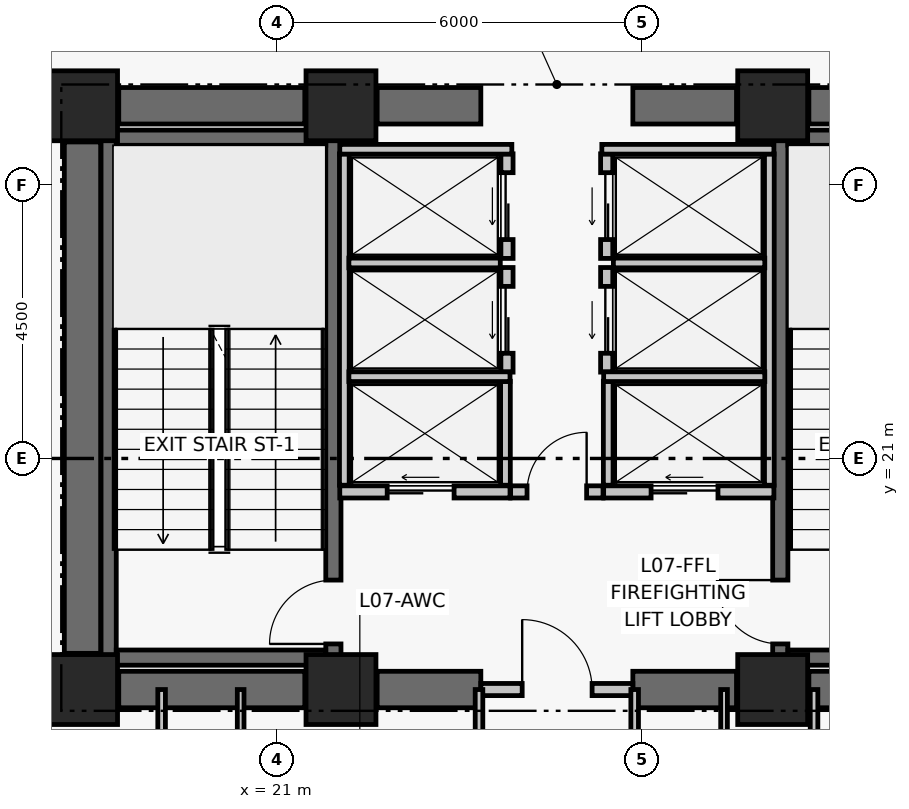
"""IFC4 building model, lengths in metres.
Left out: names, types, materials, properties, quantities, classifications, styles, units other than length and angle.
Written with IfcOpenShell. Run it as: python <this file> out.ifc"""

import sys

from ifc_helpers import new_model, si_unit, direction, frame, frame_2d, origin, origin_2d, place, context, subcontext, project, spatial, rectangle, extrude, element, fill, save


model = new_model("IFC4")
c1 = context("Model", 3, precision=1e-05, world=origin(), true_north=direction((0.0, 1.0)))
c2 = subcontext(c1, "Body", "Model", "MODEL_VIEW")
j1 = project(units=[si_unit("LENGTHUNIT", "METRE"), si_unit("PLANEANGLEUNIT", "RADIAN")], contexts=[c1])
p1 = place(None, origin())
s1 = spatial("IfcSite", under=j1, at=p1, CompositionType="ELEMENT")
p2 = place(p1, origin())
s2 = spatial("IfcBuilding", under=s1, at=p2, CompositionType="ELEMENT")
p3 = place(p2, frame((0.0, 0.0, 35.04)))
s3 = spatial("IfcBuildingStorey", under=s2, at=p3, CompositionType="ELEMENT", Elevation=35.04)
for number, where, z_axis, x_axis in (
    (1, (17.8, 17.2, 0.0), (0.0, 0.0, 1.0), (1.0, 0.0, 0.0)),
    (2, (22.05, 17.2, 0.0), (0.0, 0.0, 1.0), (1.0, 0.0, 0.0)),
    (3, (29.15, 17.2, 0.0), (0.0, 0.0, 1.0), (1.0, 0.0, 0.0)),
    (4, (17.8, 26.8, 0.0), (0.0, 0.0, 1.0), (1.0, 0.0, 0.0)),
    (5, (22.05, 26.8, 0.0), (0.0, 0.0, 1.0), (1.0, 0.0, 0.0)),
    (6, (29.15, 26.8, 0.0), (0.0, 0.0, 1.0), (1.0, 0.0, 0.0)),
):
    element("IfcColumn", number, at=place(p3, frame(where, z_axis=z_axis, x_axis=x_axis)), inside=s3, PredefinedType="COLUMN", context=c2, shape_type="SweptSolid", body=[
        extrude(rectangle(XDim=1.15, YDim=1.15, at=origin_2d()), origin(), (0.0, 0.0, 1.0), 3.72),
    ])
p4 = place(p3, frame((18.395, 17.2, 0.0), z_axis=(0.0, 0.0, 1.0), x_axis=(1.0, 0.0, 0.0)))
e7 = element("IfcWall", 7, at=p4, inside=s3, PredefinedType="SHEAR", context=c2, shape_type="SweptSolid", body=[
    extrude(rectangle(XDim=3.06, YDim=0.6, at=frame_2d((1.53, 0.0))), origin(), (0.0, 0.0, 1.0), 3.47),
])
p5 = place(p3, frame((22.645, 17.2, 0.0), z_axis=(0.0, 0.0, 1.0), x_axis=(1.0, 0.0, 0.0)))
e8 = element("IfcWall", 8, at=p5, inside=s3, PredefinedType="SHEAR", context=c2, shape_type="SweptSolid", body=[
    extrude(rectangle(XDim=1.705, YDim=0.6, at=frame_2d((0.853, 0.0))), origin(), (0.0, 0.0, 1.0), 3.47),
])
p6 = place(p3, frame((26.85, 17.2, 0.0), z_axis=(0.0, 0.0, 1.0), x_axis=(1.0, 0.0, 0.0)))
e9 = element("IfcWall", 9, at=p6, inside=s3, PredefinedType="SHEAR", context=c2, shape_type="SweptSolid", body=[
    extrude(rectangle(XDim=1.705, YDim=0.6, at=frame_2d((0.853, 0.0))), origin(), (0.0, 0.0, 1.0), 3.47),
])
p7 = place(p3, frame((29.745, 17.2, 0.0), z_axis=(0.0, 0.0, 1.0), x_axis=(1.0, 0.0, 0.0)))
e10 = element("IfcWall", 10, at=p7, inside=s3, PredefinedType="SHEAR", context=c2, shape_type="SweptSolid", body=[
    extrude(rectangle(XDim=3.06, YDim=0.6, at=frame_2d((1.53, 0.0))), origin(), (0.0, 0.0, 1.0), 3.47),
])
p8 = place(p3, frame((18.395, 26.8, 0.0), z_axis=(0.0, 0.0, 1.0), x_axis=(1.0, 0.0, 0.0)))
e11 = element("IfcWall", 11, at=p8, inside=s3, PredefinedType="SHEAR", context=c2, shape_type="SweptSolid", body=[
    extrude(rectangle(XDim=3.06, YDim=0.6, at=frame_2d((1.53, 0.0))), origin(), (0.0, 0.0, 1.0), 3.47),
])
p9 = place(p3, frame((22.645, 26.8, 0.0), z_axis=(0.0, 0.0, 1.0), x_axis=(1.0, 0.0, 0.0)))
e12 = element("IfcWall", 12, at=p9, inside=s3, PredefinedType="SHEAR", context=c2, shape_type="SweptSolid", body=[
    extrude(rectangle(XDim=1.705, YDim=0.6, at=frame_2d((0.853, 0.0))), origin(), (0.0, 0.0, 1.0), 3.47),
])
p10 = place(p3, frame((26.85, 26.8, 0.0), z_axis=(0.0, 0.0, 1.0), x_axis=(1.0, 0.0, 0.0)))
e13 = element("IfcWall", 13, at=p10, inside=s3, PredefinedType="SHEAR", context=c2, shape_type="SweptSolid", body=[
    extrude(rectangle(XDim=1.705, YDim=0.6, at=frame_2d((0.853, 0.0))), origin(), (0.0, 0.0, 1.0), 3.47),
])
p11 = place(p3, frame((29.745, 26.8, 0.0), z_axis=(0.0, 0.0, 1.0), x_axis=(1.0, 0.0, 0.0)))
e14 = element("IfcWall", 14, at=p11, inside=s3, PredefinedType="SHEAR", context=c2, shape_type="SweptSolid", body=[
    extrude(rectangle(XDim=3.06, YDim=0.6, at=frame_2d((1.53, 0.0))), origin(), (0.0, 0.0, 1.0), 3.47),
])
p12 = place(p3, frame((17.8, 17.795, 0.0), z_axis=(0.0, 0.0, 1.0), x_axis=(0.0, 1.0, 0.0)))
e15 = element("IfcWall", 15, at=p12, inside=s3, PredefinedType="SHEAR", context=c2, shape_type="SweptSolid", body=[
    extrude(rectangle(XDim=8.41, YDim=0.6, at=frame_2d((4.205, 0.0))), origin(), (0.0, 0.0, 1.0), 3.47),
])
p13 = place(p3, frame((18.229, 17.6, 0.0), z_axis=(0.0, 0.0, 1.0), x_axis=(0.0, 1.0, 0.0)))
e16 = element("IfcWall", 16, at=p13, inside=s3, PredefinedType="SHEAR", context=c2, shape_type="SweptSolid", body=[
    extrude(rectangle(XDim=8.8, YDim=0.25, at=frame_2d((4.4, 0.0))), origin(), (0.0, 0.0, 1.0), 3.47),
])
p14 = place(p3, frame((21.925, 17.6, 0.0), z_axis=(0.0, 0.0, 1.0), x_axis=(0.0, 1.0, 0.0)))
e17 = element("IfcWall", 17, at=p14, inside=s3, PredefinedType="SHEAR", context=c2, shape_type="SweptSolid", body=[
    extrude(rectangle(XDim=8.8, YDim=0.25, at=frame_2d((4.4, 0.0))), origin(), (0.0, 0.0, 1.0), 3.47),
])
p15 = place(p14, frame((0.35, 0.0, 0.0)))
e18 = element("IfcOpeningElement", 18, at=p15, cuts=e17, PredefinedType="OPENING", context=c2, shape_type="SweptSolid", body=[
    extrude(rectangle(XDim=1.05, YDim=2.08, at=frame_2d((0.525, 1.04))), frame((0.0, 0.135, 0.0), z_axis=(0.0, -1.0, 0.0), x_axis=(1.0, 0.0, 0.0)), (0.0, 0.0, 1.0), 0.27),
])
for number, where, z_axis, x_axis in (
    (19, (18.354, 17.725, 0.0), (0.0, 0.0, 1.0), (1.0, 0.0, 0.0)),
    (20, (18.354, 26.275, 0.0), (0.0, 0.0, 1.0), (1.0, 0.0, 0.0)),
):
    element("IfcWall", number, at=place(p3, frame(where, z_axis=z_axis, x_axis=x_axis)), inside=s3, PredefinedType="SHEAR", context=c2, shape_type="SweptSolid", body=[
        extrude(rectangle(XDim=3.446, YDim=0.25, at=frame_2d((1.723, 0.0))), origin(), (0.0, 0.0, 1.0), 3.47),
    ])
p16 = place(p3, frame((29.275, 17.6, 0.0), z_axis=(0.0, 0.0, 1.0), x_axis=(0.0, 1.0, 0.0)))
e21 = element("IfcWall", 21, at=p16, inside=s3, PredefinedType="SHEAR", context=c2, shape_type="SweptSolid", body=[
    extrude(rectangle(XDim=8.8, YDim=0.25, at=frame_2d((4.4, 0.0))), origin(), (0.0, 0.0, 1.0), 3.47),
])
p17 = place(p16, frame((0.35, 0.0, 0.0)))
e22 = element("IfcOpeningElement", 22, at=p17, cuts=e21, PredefinedType="OPENING", context=c2, shape_type="SweptSolid", body=[
    extrude(rectangle(XDim=1.05, YDim=2.08, at=frame_2d((0.525, 1.04))), frame((0.0, 0.135, 0.0), z_axis=(0.0, -1.0, 0.0), x_axis=(1.0, 0.0, 0.0)), (0.0, 0.0, 1.0), 0.27),
])
for number, where, z_axis, x_axis in (
    (23, (29.4, 17.725, 0.0), (0.0, 0.0, 1.0), (1.0, 0.0, 0.0)),
    (24, (29.4, 26.275, 0.0), (0.0, 0.0, 1.0), (1.0, 0.0, 0.0)),
):
    element("IfcWall", number, at=place(p3, frame(where, z_axis=z_axis, x_axis=x_axis)), inside=s3, PredefinedType="SHEAR", context=c2, shape_type="SweptSolid", body=[
        extrude(rectangle(XDim=3.446, YDim=0.25, at=frame_2d((1.723, 0.0))), origin(), (0.0, 0.0, 1.0), 3.47),
    ])
p18 = place(p3, frame((24.35, 17.2, 0.0), z_axis=(0.0, 0.0, 1.0), x_axis=(1.0, 0.0, 0.0)))
e25 = element("IfcWall", 25, at=p18, inside=s3, PredefinedType="PARTITIONING", context=c2, shape_type="SweptSolid", body=[
    extrude(rectangle(XDim=2.5, YDim=0.2, at=frame_2d((1.25, 0.0))), origin(), (0.0, 0.0, 1.0), 2.6),
])
p19 = place(p18, frame((0.68, 0.0, 0.0)))
e26 = element("IfcOpeningElement", 26, at=p19, cuts=e25, PredefinedType="OPENING", context=c2, shape_type="SweptSolid", body=[
    extrude(rectangle(XDim=1.15, YDim=2.08, at=frame_2d((0.575, 1.04))), frame((0.0, 0.11, 0.0), z_axis=(0.0, -1.0, 0.0), x_axis=(1.0, 0.0, 0.0)), (0.0, 0.0, 1.0), 0.22),
])
p20 = place(p3, frame((24.84, 20.45, 0.0), z_axis=(0.0, 0.0, 1.0), x_axis=(1.0, 0.0, 0.0)))
e27 = element("IfcWall", 27, at=p20, inside=s3, PredefinedType="PARTITIONING", context=c2, shape_type="SweptSolid", body=[
    extrude(rectangle(XDim=1.52, YDim=0.2, at=frame_2d((0.76, 0.0))), origin(), (0.0, 0.0, 1.0), 3.47),
])
p21 = place(p20, frame((0.27, 0.0, 0.0)))
e28 = element("IfcOpeningElement", 28, at=p21, cuts=e27, PredefinedType="OPENING", context=c2, shape_type="SweptSolid", body=[
    extrude(rectangle(XDim=0.98, YDim=2.06, at=frame_2d((0.49, 1.03))), frame((0.0, 0.11, 0.0), z_axis=(0.0, -1.0, 0.0), x_axis=(1.0, 0.0, 0.0)), (0.0, 0.0, 1.0), 0.22),
])
p22 = place(p3, frame((22.03, 20.45, 0.0), z_axis=(0.0, 0.0, 1.0), x_axis=(1.0, 0.0, 0.0)))
e29 = element("IfcWall", 29, at=p22, inside=s3, PredefinedType="PARTITIONING", context=c2, shape_type="SweptSolid", body=[
    extrude(rectangle(XDim=2.8, YDim=0.2, at=frame_2d((1.4, 0.0))), origin(), (0.0, 0.0, 1.0), 3.47),
])
p23 = place(p22, frame((0.78, 0.0, 0.0)))
e30 = element("IfcOpeningElement", 30, at=p23, cuts=e29, PredefinedType="OPENING", context=c2, shape_type="SweptSolid", body=[
    extrude(rectangle(XDim=1.1, YDim=2.08, at=frame_2d((0.55, 1.04))), frame((0.0, 0.11, 0.0), z_axis=(0.0, -1.0, 0.0), x_axis=(1.0, 0.0, 0.0)), (0.0, 0.0, 1.0), 0.22),
])
p24 = place(p3, frame((26.37, 20.45, 0.0), z_axis=(0.0, 0.0, 1.0), x_axis=(1.0, 0.0, 0.0)))
e31 = element("IfcWall", 31, at=p24, inside=s3, PredefinedType="PARTITIONING", context=c2, shape_type="SweptSolid", body=[
    extrude(rectangle(XDim=2.8, YDim=0.2, at=frame_2d((1.4, 0.0))), origin(), (0.0, 0.0, 1.0), 3.47),
])
p25 = place(p24, frame((0.78, 0.0, 0.0)))
e32 = element("IfcOpeningElement", 32, at=p25, cuts=e31, PredefinedType="OPENING", context=c2, shape_type="SweptSolid", body=[
    extrude(rectangle(XDim=1.1, YDim=2.08, at=frame_2d((0.55, 1.04))), frame((0.0, 0.11, 0.0), z_axis=(0.0, -1.0, 0.0), x_axis=(1.0, 0.0, 0.0)), (0.0, 0.0, 1.0), 0.22),
])
p26 = place(p3, frame((24.78, 22.42, 0.0), z_axis=(0.0, 0.0, 1.0), x_axis=(0.0, 1.0, 0.0)))
e33 = element("IfcWall", 33, at=p26, inside=s3, PredefinedType="PARTITIONING", context=c2, shape_type="SweptSolid", body=[
    extrude(rectangle(XDim=1.72, YDim=0.2, at=frame_2d((0.86, 0.0))), origin(), (0.0, 0.0, 1.0), 3.47),
])
p27 = place(p26, frame((0.31, 0.0, 0.0)))
e34 = element("IfcOpeningElement", 34, at=p27, cuts=e33, PredefinedType="OPENING", context=c2, shape_type="SweptSolid", body=[
    extrude(rectangle(XDim=1.1, YDim=2.08, at=frame_2d((0.55, 1.04))), frame((0.0, 0.11, 0.0), z_axis=(0.0, -1.0, 0.0), x_axis=(1.0, 0.0, 0.0)), (0.0, 0.0, 1.0), 0.22),
])
p28 = place(p3, frame((24.78, 24.29, 0.0), z_axis=(0.0, 0.0, 1.0), x_axis=(0.0, 1.0, 0.0)))
e35 = element("IfcWall", 35, at=p28, inside=s3, PredefinedType="PARTITIONING", context=c2, shape_type="SweptSolid", body=[
    extrude(rectangle(XDim=1.72, YDim=0.2, at=frame_2d((0.86, 0.0))), origin(), (0.0, 0.0, 1.0), 3.47),
])
p29 = place(p28, frame((0.31, 0.0, 0.0)))
e36 = element("IfcOpeningElement", 36, at=p29, cuts=e35, PredefinedType="OPENING", context=c2, shape_type="SweptSolid", body=[
    extrude(rectangle(XDim=1.1, YDim=2.08, at=frame_2d((0.55, 1.04))), frame((0.0, 0.11, 0.0), z_axis=(0.0, -1.0, 0.0), x_axis=(1.0, 0.0, 0.0)), (0.0, 0.0, 1.0), 0.22),
])
p30 = place(p3, frame((26.42, 22.42, 0.0), z_axis=(0.0, 0.0, 1.0), x_axis=(0.0, 1.0, 0.0)))
e37 = element("IfcWall", 37, at=p30, inside=s3, PredefinedType="PARTITIONING", context=c2, shape_type="SweptSolid", body=[
    extrude(rectangle(XDim=1.72, YDim=0.2, at=frame_2d((0.86, 0.0))), origin(), (0.0, 0.0, 1.0), 3.47),
])
p31 = place(p30, frame((0.31, 0.0, 0.0)))
e38 = element("IfcOpeningElement", 38, at=p31, cuts=e37, PredefinedType="OPENING", context=c2, shape_type="SweptSolid", body=[
    extrude(rectangle(XDim=1.1, YDim=2.08, at=frame_2d((0.55, 1.04))), frame((0.0, 0.11, 0.0), z_axis=(0.0, -1.0, 0.0), x_axis=(1.0, 0.0, 0.0)), (0.0, 0.0, 1.0), 0.22),
])
p32 = place(p3, frame((26.42, 24.29, 0.0), z_axis=(0.0, 0.0, 1.0), x_axis=(0.0, 1.0, 0.0)))
e39 = element("IfcWall", 39, at=p32, inside=s3, PredefinedType="PARTITIONING", context=c2, shape_type="SweptSolid", body=[
    extrude(rectangle(XDim=1.72, YDim=0.2, at=frame_2d((0.86, 0.0))), origin(), (0.0, 0.0, 1.0), 3.47),
])
p33 = place(p32, frame((0.31, 0.0, 0.0)))
e40 = element("IfcOpeningElement", 40, at=p33, cuts=e39, PredefinedType="OPENING", context=c2, shape_type="SweptSolid", body=[
    extrude(rectangle(XDim=1.1, YDim=2.08, at=frame_2d((0.55, 1.04))), frame((0.0, 0.11, 0.0), z_axis=(0.0, -1.0, 0.0), x_axis=(1.0, 0.0, 0.0)), (0.0, 0.0, 1.0), 0.22),
])
p34 = place(p3, frame((22.105, 20.56, 0.0), z_axis=(0.0, 0.0, 1.0), x_axis=(0.0, 1.0, 0.0)))
e41 = element("IfcWall", 41, at=p34, inside=s3, PredefinedType="PARTITIONING", context=c2, shape_type="SweptSolid", body=[
    extrude(rectangle(XDim=5.45, YDim=0.16, at=frame_2d((2.725, 0.0))), origin(), (0.0, 0.0, 1.0), 3.47),
])
p35 = place(p3, frame((24.755, 20.56, 0.0), z_axis=(0.0, 0.0, 1.0), x_axis=(0.0, 1.0, 0.0)))
e42 = element("IfcWall", 42, at=p35, inside=s3, PredefinedType="PARTITIONING", context=c2, shape_type="SweptSolid", body=[
    extrude(rectangle(XDim=1.71, YDim=0.16, at=frame_2d((0.855, 0.0))), origin(), (0.0, 0.0, 1.0), 3.47),
])
p36 = place(p3, frame((22.18, 22.345, 0.0), z_axis=(0.0, 0.0, 1.0), x_axis=(1.0, 0.0, 0.0)))
e43 = element("IfcWall", 43, at=p36, inside=s3, PredefinedType="PARTITIONING", context=c2, shape_type="SweptSolid", body=[
    extrude(rectangle(XDim=2.65, YDim=0.16, at=frame_2d((1.325, 0.0))), origin(), (0.0, 0.0, 1.0), 3.47),
])
p37 = place(p3, frame((22.18, 24.215, 0.0), z_axis=(0.0, 0.0, 1.0), x_axis=(1.0, 0.0, 0.0)))
e44 = element("IfcWall", 44, at=p37, inside=s3, PredefinedType="PARTITIONING", context=c2, shape_type="SweptSolid", body=[
    extrude(rectangle(XDim=2.49, YDim=0.16, at=frame_2d((1.245, 0.0))), origin(), (0.0, 0.0, 1.0), 3.47),
])
p38 = place(p3, frame((22.03, 26.085, 0.0), z_axis=(0.0, 0.0, 1.0), x_axis=(1.0, 0.0, 0.0)))
e45 = element("IfcWall", 45, at=p38, inside=s3, PredefinedType="PARTITIONING", context=c2, shape_type="SweptSolid", body=[
    extrude(rectangle(XDim=2.83, YDim=0.16, at=frame_2d((1.415, 0.0))), origin(), (0.0, 0.0, 1.0), 3.47),
])
p39 = place(p3, frame((29.095, 20.56, 0.0), z_axis=(0.0, 0.0, 1.0), x_axis=(0.0, 1.0, 0.0)))
e46 = element("IfcWall", 46, at=p39, inside=s3, PredefinedType="PARTITIONING", context=c2, shape_type="SweptSolid", body=[
    extrude(rectangle(XDim=5.45, YDim=0.16, at=frame_2d((2.725, 0.0))), origin(), (0.0, 0.0, 1.0), 3.47),
])
p40 = place(p3, frame((26.445, 20.56, 0.0), z_axis=(0.0, 0.0, 1.0), x_axis=(0.0, 1.0, 0.0)))
e47 = element("IfcWall", 47, at=p40, inside=s3, PredefinedType="PARTITIONING", context=c2, shape_type="SweptSolid", body=[
    extrude(rectangle(XDim=1.71, YDim=0.16, at=frame_2d((0.855, 0.0))), origin(), (0.0, 0.0, 1.0), 3.47),
])
p41 = place(p3, frame((26.37, 22.345, 0.0), z_axis=(0.0, 0.0, 1.0), x_axis=(1.0, 0.0, 0.0)))
e48 = element("IfcWall", 48, at=p41, inside=s3, PredefinedType="PARTITIONING", context=c2, shape_type="SweptSolid", body=[
    extrude(rectangle(XDim=2.65, YDim=0.16, at=frame_2d((1.325, 0.0))), origin(), (0.0, 0.0, 1.0), 3.47),
])
p42 = place(p3, frame((26.53, 24.215, 0.0), z_axis=(0.0, 0.0, 1.0), x_axis=(1.0, 0.0, 0.0)))
e49 = element("IfcWall", 49, at=p42, inside=s3, PredefinedType="PARTITIONING", context=c2, shape_type="SweptSolid", body=[
    extrude(rectangle(XDim=2.49, YDim=0.16, at=frame_2d((1.245, 0.0))), origin(), (0.0, 0.0, 1.0), 3.47),
])
p43 = place(p3, frame((26.34, 26.085, 0.0), z_axis=(0.0, 0.0, 1.0), x_axis=(1.0, 0.0, 0.0)))
e50 = element("IfcWall", 50, at=p43, inside=s3, PredefinedType="PARTITIONING", context=c2, shape_type="SweptSolid", body=[
    extrude(rectangle(XDim=2.83, YDim=0.16, at=frame_2d((1.415, 0.0))), origin(), (0.0, 0.0, 1.0), 3.47),
])
p44 = place(p3, frame((19.1, 14.95, 0.0), z_axis=(0.0, 0.0, 1.0), x_axis=(0.0, 1.0, 0.0)))
e51 = element("IfcWall", 51, at=p44, inside=s3, PredefinedType="PARTITIONING", context=c2, shape_type="SweptSolid", body=[
    extrude(rectangle(XDim=2.25, YDim=0.125, at=frame_2d((1.125, 0.0))), origin(), (0.0, 0.0, 1.0), 2.6),
])
p45 = place(p3, frame((20.4, 14.95, 0.0), z_axis=(0.0, 0.0, 1.0), x_axis=(0.0, 1.0, 0.0)))
e52 = element("IfcWall", 52, at=p45, inside=s3, PredefinedType="PARTITIONING", context=c2, shape_type="SweptSolid", body=[
    extrude(rectangle(XDim=2.25, YDim=0.11, at=frame_2d((1.125, 0.0))), origin(), (0.0, 0.0, 1.0), 2.6),
])
for number, where, z_axis, x_axis in (
    (53, (24.32, 14.95, 0.0), (0.0, 0.0, 1.0), (0.0, 1.0, 0.0)),
    (54, (26.88, 14.95, 0.0), (0.0, 0.0, 1.0), (0.0, 1.0, 0.0)),
):
    element("IfcWall", number, at=place(p3, frame(where, z_axis=z_axis, x_axis=x_axis)), inside=s3, PredefinedType="PARTITIONING", context=c2, shape_type="SweptSolid", body=[
        extrude(rectangle(XDim=2.25, YDim=0.125, at=frame_2d((1.125, 0.0))), origin(), (0.0, 0.0, 1.0), 2.6),
    ])
p46 = place(p3, frame((28.35, 14.95, 0.0), z_axis=(0.0, 0.0, 1.0), x_axis=(0.0, 1.0, 0.0)))
e55 = element("IfcWall", 55, at=p46, inside=s3, PredefinedType="PARTITIONING", context=c2, shape_type="SweptSolid", body=[
    extrude(rectangle(XDim=2.25, YDim=0.11, at=frame_2d((1.125, 0.0))), origin(), (0.0, 0.0, 1.0), 2.6),
])
p47 = place(p3, frame((29.83, 14.95, 0.0), z_axis=(0.0, 0.0, 1.0), x_axis=(0.0, 1.0, 0.0)))
e56 = element("IfcWall", 56, at=p47, inside=s3, PredefinedType="PARTITIONING", context=c2, shape_type="SweptSolid", body=[
    extrude(rectangle(XDim=2.25, YDim=0.125, at=frame_2d((1.125, 0.0))), origin(), (0.0, 0.0, 1.0), 2.6),
])
p48 = place(p15, origin())
e57 = element("IfcDoor", 57, at=p48, inside=s3, OperationType="SINGLE_SWING_LEFT", PredefinedType="DOOR", context=c2, shape_type="SweptSolid", body=[
    extrude(rectangle(XDim=1.05, YDim=2.08, at=frame_2d((0.525, 1.04))), frame((0.0, 0.025, 0.0), z_axis=(0.0, -1.0, 0.0), x_axis=(1.0, 0.0, 0.0)), (0.0, 0.0, 1.0), 0.05),
])
fill(e18, e57)
p49 = place(p17, origin())
e58 = element("IfcDoor", 58, at=p49, inside=s3, OperationType="SINGLE_SWING_RIGHT", PredefinedType="DOOR", context=c2, shape_type="SweptSolid", body=[
    extrude(rectangle(XDim=1.05, YDim=2.08, at=frame_2d((0.525, 1.04))), frame((0.0, 0.025, 0.0), z_axis=(0.0, -1.0, 0.0), x_axis=(1.0, 0.0, 0.0)), (0.0, 0.0, 1.0), 0.05),
])
fill(e22, e58)
p50 = place(p19, origin())
e59 = element("IfcDoor", 59, at=p50, inside=s3, OperationType="SINGLE_SWING_LEFT", PredefinedType="DOOR", context=c2, shape_type="SweptSolid", body=[
    extrude(rectangle(XDim=1.15, YDim=2.08, at=frame_2d((0.575, 1.04))), frame((0.0, 0.025, 0.0), z_axis=(0.0, -1.0, 0.0), x_axis=(1.0, 0.0, 0.0)), (0.0, 0.0, 1.0), 0.05),
])
fill(e26, e59)
p51 = place(p21, origin())
e60 = element("IfcDoor", 60, at=p51, inside=s3, OperationType="SINGLE_SWING_RIGHT", PredefinedType="DOOR", context=c2, shape_type="SweptSolid", body=[
    extrude(rectangle(XDim=0.98, YDim=2.06, at=frame_2d((0.49, 1.03))), frame((0.0, 0.025, 0.0), z_axis=(0.0, -1.0, 0.0), x_axis=(1.0, 0.0, 0.0)), (0.0, 0.0, 1.0), 0.05),
])
fill(e28, e60)
p52 = place(p23, origin())
e61 = element("IfcDoor", 61, at=p52, inside=s3, OperationType="DOUBLE_DOOR_SLIDING", PredefinedType="DOOR", context=c2, shape_type="SweptSolid", body=[
    extrude(rectangle(XDim=1.1, YDim=2.08, at=frame_2d((0.55, 1.04))), frame((0.0, 0.025, 0.0), z_axis=(0.0, -1.0, 0.0), x_axis=(1.0, 0.0, 0.0)), (0.0, 0.0, 1.0), 0.05),
])
fill(e30, e61)
p53 = place(p25, origin())
e62 = element("IfcDoor", 62, at=p53, inside=s3, OperationType="DOUBLE_DOOR_SLIDING", PredefinedType="DOOR", context=c2, shape_type="SweptSolid", body=[
    extrude(rectangle(XDim=1.1, YDim=2.08, at=frame_2d((0.55, 1.04))), frame((0.0, 0.025, 0.0), z_axis=(0.0, -1.0, 0.0), x_axis=(1.0, 0.0, 0.0)), (0.0, 0.0, 1.0), 0.05),
])
fill(e32, e62)
p54 = place(p27, origin())
e63 = element("IfcDoor", 63, at=p54, inside=s3, OperationType="DOUBLE_DOOR_SLIDING", PredefinedType="DOOR", context=c2, shape_type="SweptSolid", body=[
    extrude(rectangle(XDim=1.1, YDim=2.08, at=frame_2d((0.55, 1.04))), frame((0.0, 0.025, 0.0), z_axis=(0.0, -1.0, 0.0), x_axis=(1.0, 0.0, 0.0)), (0.0, 0.0, 1.0), 0.05),
])
fill(e34, e63)
p55 = place(p29, origin())
e64 = element("IfcDoor", 64, at=p55, inside=s3, OperationType="DOUBLE_DOOR_SLIDING", PredefinedType="DOOR", context=c2, shape_type="SweptSolid", body=[
    extrude(rectangle(XDim=1.1, YDim=2.08, at=frame_2d((0.55, 1.04))), frame((0.0, 0.025, 0.0), z_axis=(0.0, -1.0, 0.0), x_axis=(1.0, 0.0, 0.0)), (0.0, 0.0, 1.0), 0.05),
])
fill(e36, e64)
p56 = place(p31, origin())
e65 = element("IfcDoor", 65, at=p56, inside=s3, OperationType="DOUBLE_DOOR_SLIDING", PredefinedType="DOOR", context=c2, shape_type="SweptSolid", body=[
    extrude(rectangle(XDim=1.1, YDim=2.08, at=frame_2d((0.55, 1.04))), frame((0.0, 0.025, 0.0), z_axis=(0.0, -1.0, 0.0), x_axis=(1.0, 0.0, 0.0)), (0.0, 0.0, 1.0), 0.05),
])
fill(e38, e65)
p57 = place(p33, origin())
e66 = element("IfcDoor", 66, at=p57, inside=s3, OperationType="DOUBLE_DOOR_SLIDING", PredefinedType="DOOR", context=c2, shape_type="SweptSolid", body=[
    extrude(rectangle(XDim=1.1, YDim=2.08, at=frame_2d((0.55, 1.04))), frame((0.0, 0.025, 0.0), z_axis=(0.0, -1.0, 0.0), x_axis=(1.0, 0.0, 0.0)), (0.0, 0.0, 1.0), 0.05),
])
fill(e40, e66)
save(model, sys.argv[1])
